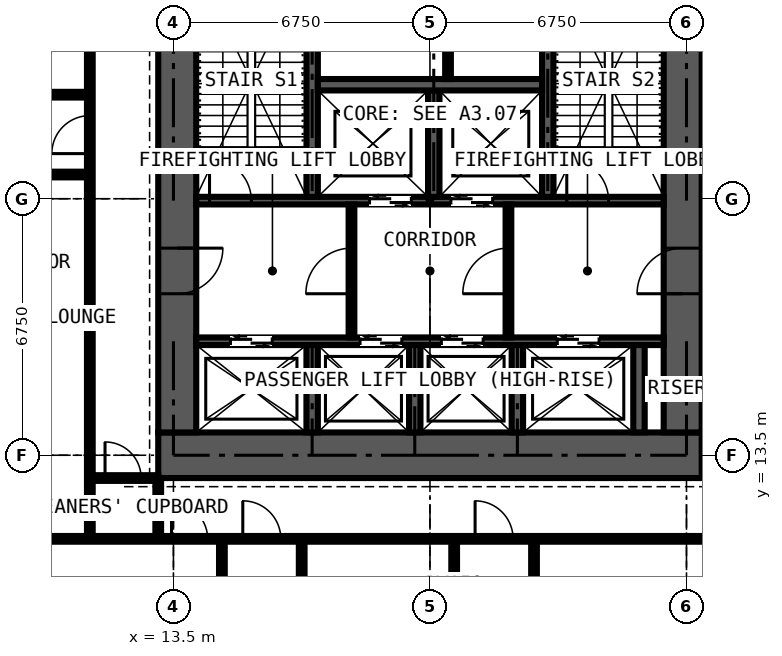
"""IFC4 building model, lengths in metres.
Left out: names, types, materials, properties, quantities, classifications, styles, units other than length and angle.
Written with IfcOpenShell. Run it as: python <this file> out.ifc"""

import sys

from ifc_helpers import new_model, si_unit, direction, frame, frame_2d, origin, place, context, subcontext, project, spatial, rectangle, extrude, element, fill, save


model = new_model("IFC4")
c1 = context("Model", 3, precision=1e-05, world=origin(), true_north=direction((0.0, 1.0)))
c2 = subcontext(c1, "Body", "Model", "MODEL_VIEW")
j1 = project(units=[si_unit("LENGTHUNIT", "METRE"), si_unit("PLANEANGLEUNIT", "RADIAN")], contexts=[c1])
p1 = place(None, origin())
s1 = spatial("IfcSite", under=j1, at=p1, CompositionType="ELEMENT")
p2 = place(p1, origin())
s2 = spatial("IfcBuilding", under=s1, at=p2, CompositionType="ELEMENT")
p3 = place(p2, frame((0.0, 0.0, 160.2)))
s3 = spatial("IfcBuildingStorey", under=s2, at=p3, CompositionType="ELEMENT", Elevation=160.2)
p4 = place(p3, frame((13.1, 13.5, 0.0), z_axis=(0.0, 0.0, 1.0), x_axis=(1.0, 0.0, 0.0)))
e1 = element("IfcWall", 1, at=p4, inside=s3, PredefinedType="SHEAR", context=c2, shape_type="SweptSolid", body=[
    extrude(rectangle(XDim=14.3, YDim=1.2, at=frame_2d((7.15, 0.0))), origin(), (0.0, 0.0, 1.0), 3.6),
])
p5 = place(p3, frame((26.9, 14.1, 0.0), z_axis=(0.0, 0.0, 1.0), x_axis=(0.0, 1.0, 0.0)))
e2 = element("IfcWall", 2, at=p5, inside=s3, PredefinedType="SHEAR", context=c2, shape_type="SweptSolid", body=[
    extrude(rectangle(XDim=12.3, YDim=1.0, at=frame_2d((6.15, 0.0))), origin(), (0.0, 0.0, 1.0), 3.6),
])
p6 = place(p5, frame((3.65, 0.0, 0.0)))
e3 = element("IfcOpeningElement", 3, at=p6, cuts=e2, PredefinedType="OPENING", context=c2, shape_type="SweptSolid", body=[
    extrude(rectangle(XDim=1.2, YDim=2.2, at=frame_2d((0.6, 1.1))), frame((0.0, 0.51, 0.0), z_axis=(0.0, -1.0, 0.0), x_axis=(1.0, 0.0, 0.0)), (0.0, 0.0, 1.0), 1.02),
])
p7 = place(p3, frame((13.6, 26.4, 0.0), z_axis=(0.0, 0.0, 1.0), x_axis=(0.0, -1.0, 0.0)))
e4 = element("IfcWall", 4, at=p7, inside=s3, PredefinedType="SHEAR", context=c2, shape_type="SweptSolid", body=[
    extrude(rectangle(XDim=12.3, YDim=1.0, at=frame_2d((6.15, 0.0))), origin(), (0.0, 0.0, 1.0), 3.6),
])
p8 = place(p7, frame((7.45, 0.0, 0.0)))
e5 = element("IfcOpeningElement", 5, at=p8, cuts=e4, PredefinedType="OPENING", context=c2, shape_type="SweptSolid", body=[
    extrude(rectangle(XDim=1.2, YDim=2.2, at=frame_2d((0.6, 1.1))), frame((0.0, 0.51, 0.0), z_axis=(0.0, -1.0, 0.0), x_axis=(1.0, 0.0, 0.0)), (0.0, 0.0, 1.0), 1.02),
])
p9 = place(p3, frame((14.1, 16.5, 0.0), z_axis=(0.0, 0.0, 1.0), x_axis=(1.0, 0.0, 0.0)))
e6 = element("IfcWall", 6, at=p9, inside=s3, PredefinedType="SHEAR", context=c2, shape_type="SweptSolid", body=[
    extrude(rectangle(XDim=12.3, YDim=0.2, at=frame_2d((6.15, 0.0))), origin(), (0.0, 0.0, 1.0), 3.6),
])
p10 = place(p9, frame((0.9, 0.0, 0.0)))
e7 = element("IfcOpeningElement", 7, at=p10, cuts=e6, PredefinedType="OPENING", context=c2, shape_type="SweptSolid", body=[
    extrude(rectangle(XDim=1.1, YDim=2.2, at=frame_2d((0.55, 1.1))), frame((0.0, 0.11, 0.0), z_axis=(0.0, -1.0, 0.0), x_axis=(1.0, 0.0, 0.0)), (0.0, 0.0, 1.0), 0.22),
])
p11 = place(p9, frame((4.31, 0.0, 0.0)))
e8 = element("IfcOpeningElement", 8, at=p11, cuts=e6, PredefinedType="OPENING", context=c2, shape_type="SweptSolid", body=[
    extrude(rectangle(XDim=1.1, YDim=2.2, at=frame_2d((0.55, 1.1))), frame((0.0, 0.11, 0.0), z_axis=(0.0, -1.0, 0.0), x_axis=(1.0, 0.0, 0.0)), (0.0, 0.0, 1.0), 0.22),
])
p12 = place(p9, frame((6.45, 0.0, 0.0)))
e9 = element("IfcOpeningElement", 9, at=p12, cuts=e6, PredefinedType="OPENING", context=c2, shape_type="SweptSolid", body=[
    extrude(rectangle(XDim=1.1, YDim=2.2, at=frame_2d((0.55, 1.1))), frame((0.0, 0.11, 0.0), z_axis=(0.0, -1.0, 0.0), x_axis=(1.0, 0.0, 0.0)), (0.0, 0.0, 1.0), 0.22),
])
p13 = place(p9, frame((9.5, 0.0, 0.0)))
e10 = element("IfcOpeningElement", 10, at=p13, cuts=e6, PredefinedType="OPENING", context=c2, shape_type="SweptSolid", body=[
    extrude(rectangle(XDim=1.1, YDim=2.2, at=frame_2d((0.55, 1.1))), frame((0.0, 0.11, 0.0), z_axis=(0.0, -1.0, 0.0), x_axis=(1.0, 0.0, 0.0)), (0.0, 0.0, 1.0), 0.22),
])
p14 = place(p3, frame((14.1, 20.2, 0.0), z_axis=(0.0, 0.0, 1.0), x_axis=(1.0, 0.0, 0.0)))
e11 = element("IfcWall", 11, at=p14, inside=s3, PredefinedType="SHEAR", context=c2, shape_type="SweptSolid", body=[
    extrude(rectangle(XDim=12.3, YDim=0.2, at=frame_2d((6.15, 0.0))), origin(), (0.0, 0.0, 1.0), 3.6),
])
p15 = place(p14, frame((4.56, 0.0, 0.0)))
e12 = element("IfcOpeningElement", 12, at=p15, cuts=e11, PredefinedType="OPENING", context=c2, shape_type="SweptSolid", body=[
    extrude(rectangle(XDim=1.1, YDim=2.2, at=frame_2d((0.55, 1.1))), frame((0.0, 0.11, 0.0), z_axis=(0.0, -1.0, 0.0), x_axis=(1.0, 0.0, 0.0)), (0.0, 0.0, 1.0), 0.22),
])
p16 = place(p14, frame((6.7, 0.0, 0.0)))
e13 = element("IfcOpeningElement", 13, at=p16, cuts=e11, PredefinedType="OPENING", context=c2, shape_type="SweptSolid", body=[
    extrude(rectangle(XDim=1.1, YDim=2.2, at=frame_2d((0.55, 1.1))), frame((0.0, 0.11, 0.0), z_axis=(0.0, -1.0, 0.0), x_axis=(1.0, 0.0, 0.0)), (0.0, 0.0, 1.0), 0.22),
])
p17 = place(p14, frame((0.35, 0.0, 0.0)))
e14 = element("IfcOpeningElement", 14, at=p17, cuts=e11, PredefinedType="OPENING", context=c2, shape_type="SweptSolid", body=[
    extrude(rectangle(XDim=1.1, YDim=2.2, at=frame_2d((0.55, 1.1))), frame((0.0, 0.11, 0.0), z_axis=(0.0, -1.0, 0.0), x_axis=(1.0, 0.0, 0.0)), (0.0, 0.0, 1.0), 0.22),
])
p18 = place(p14, frame((9.75, 0.0, 0.0)))
e15 = element("IfcOpeningElement", 15, at=p18, cuts=e11, PredefinedType="OPENING", context=c2, shape_type="SweptSolid", body=[
    extrude(rectangle(XDim=1.1, YDim=2.2, at=frame_2d((0.55, 1.1))), frame((0.0, 0.11, 0.0), z_axis=(0.0, -1.0, 0.0), x_axis=(1.0, 0.0, 0.0)), (0.0, 0.0, 1.0), 0.22),
])
for number, where, z_axis, x_axis in (
    (16, (17.15, 20.3, 0.0), (0.0, 0.0, 1.0), (0.0, 1.0, 0.0)),
    (17, (23.35, 20.3, 0.0), (0.0, 0.0, 1.0), (0.0, 1.0, 0.0)),
):
    element("IfcWall", number, at=place(p3, frame(where, z_axis=z_axis, x_axis=x_axis)), inside=s3, PredefinedType="SHEAR", context=c2, shape_type="SweptSolid", body=[
        extrude(rectangle(XDim=6.1, YDim=0.3, at=frame_2d((3.05, 0.0))), origin(), (0.0, 0.0, 1.0), 3.6),
    ])
p19 = place(p3, frame((20.35, 20.3, 0.0), z_axis=(0.0, 0.0, 1.0), x_axis=(0.0, 1.0, 0.0)))
e18 = element("IfcWall", 18, at=p19, inside=s3, PredefinedType="SHEAR", context=c2, shape_type="SweptSolid", body=[
    extrude(rectangle(XDim=2.8, YDim=0.3, at=frame_2d((1.4, 0.0))), origin(), (0.0, 0.0, 1.0), 3.6),
])
p20 = place(p3, frame((17.3, 23.25, 0.0), z_axis=(0.0, 0.0, 1.0), x_axis=(1.0, 0.0, 0.0)))
e19 = element("IfcWall", 19, at=p20, inside=s3, PredefinedType="SHEAR", context=c2, shape_type="SweptSolid", body=[
    extrude(rectangle(XDim=5.9, YDim=0.3, at=frame_2d((2.95, 0.0))), origin(), (0.0, 0.0, 1.0), 3.6),
])
for number, where, z_axis, x_axis in (
    (20, (17.15, 14.1, 0.0), (0.0, 0.0, 1.0), (0.0, 1.0, 0.0)),
    (21, (19.85, 14.1, 0.0), (0.0, 0.0, 1.0), (0.0, 1.0, 0.0)),
    (22, (22.55, 14.1, 0.0), (0.0, 0.0, 1.0), (0.0, 1.0, 0.0)),
    (23, (25.75, 14.1, 0.0), (0.0, 0.0, 1.0), (0.0, 1.0, 0.0)),
):
    element("IfcWall", number, at=place(p3, frame(where, z_axis=z_axis, x_axis=x_axis)), inside=s3, PredefinedType="SHEAR", context=c2, shape_type="SweptSolid", body=[
        extrude(rectangle(XDim=2.3, YDim=0.3, at=frame_2d((1.15, 0.0))), origin(), (0.0, 0.0, 1.0), 3.6),
    ])
p21 = place(p3, frame((18.185, 16.6, 0.0), z_axis=(0.0, 0.0, 1.0), x_axis=(0.0, 1.0, 0.0)))
e24 = element("IfcWall", 24, at=p21, inside=s3, PredefinedType="PARTITIONING", context=c2, shape_type="SweptSolid", body=[
    extrude(rectangle(XDim=3.5, YDim=0.15, at=frame_2d((1.75, 0.0))), origin(), (0.0, 0.0, 1.0), 3.375),
])
p22 = place(p21, frame((1.15, 0.0, 0.0)))
e25 = element("IfcOpeningElement", 25, at=p22, cuts=e24, PredefinedType="OPENING", context=c2, shape_type="SweptSolid", body=[
    extrude(rectangle(XDim=1.2, YDim=2.2, at=frame_2d((0.6, 1.1))), frame((0.0, 0.085, 0.0), z_axis=(0.0, -1.0, 0.0), x_axis=(1.0, 0.0, 0.0)), (0.0, 0.0, 1.0), 0.17),
])
p23 = place(p3, frame((22.315, 16.6, 0.0), z_axis=(0.0, 0.0, 1.0), x_axis=(0.0, 1.0, 0.0)))
e26 = element("IfcWall", 26, at=p23, inside=s3, PredefinedType="PARTITIONING", context=c2, shape_type="SweptSolid", body=[
    extrude(rectangle(XDim=3.5, YDim=0.15, at=frame_2d((1.75, 0.0))), origin(), (0.0, 0.0, 1.0), 3.375),
])
p24 = place(p23, frame((1.15, 0.0, 0.0)))
e27 = element("IfcOpeningElement", 27, at=p24, cuts=e26, PredefinedType="OPENING", context=c2, shape_type="SweptSolid", body=[
    extrude(rectangle(XDim=1.2, YDim=2.2, at=frame_2d((0.6, 1.1))), frame((0.0, 0.085, 0.0), z_axis=(0.0, -1.0, 0.0), x_axis=(1.0, 0.0, 0.0)), (0.0, 0.0, 1.0), 0.17),
])
p25 = place(p3, frame((20.725, 23.4, 0.0), z_axis=(0.0, 0.0, 1.0), x_axis=(0.0, 1.0, 0.0)))
e28 = element("IfcWall", 28, at=p25, inside=s3, PredefinedType="PARTITIONING", context=c2, shape_type="SweptSolid", body=[
    extrude(rectangle(XDim=3.0, YDim=0.15, at=frame_2d((1.5, 0.0))), origin(), (0.0, 0.0, 1.0), 3.375),
])
p26 = place(p3, frame((5.65, 20.887, 0.0), z_axis=(0.0, 0.0, 1.0), x_axis=(1.0, 0.0, 0.0)))
e29 = element("IfcWall", 29, at=p26, inside=s3, PredefinedType="PARTITIONING", context=c2, shape_type="SweptSolid", body=[
    extrude(rectangle(XDim=5.65, YDim=0.15, at=frame_2d((2.825, 0.0))), origin(), (0.0, 0.0, 1.0), 3.375),
])
p27 = place(p3, frame((5.65, 22.988, 0.0), z_axis=(0.0, 0.0, 1.0), x_axis=(1.0, 0.0, 0.0)))
e30 = element("IfcWall", 30, at=p27, inside=s3, PredefinedType="PARTITIONING", context=c2, shape_type="SweptSolid", body=[
    extrude(rectangle(XDim=5.65, YDim=0.15, at=frame_2d((2.825, 0.0))), origin(), (0.0, 0.0, 1.0), 3.375),
])
p28 = place(p27, frame((2.35, 0.0, 0.0)))
e31 = element("IfcOpeningElement", 31, at=p28, cuts=e30, PredefinedType="OPENING", context=c2, shape_type="SweptSolid", body=[
    extrude(rectangle(XDim=0.95, YDim=2.2, at=frame_2d((0.475, 1.1))), frame((0.0, 0.085, 0.0), z_axis=(0.0, -1.0, 0.0), x_axis=(1.0, 0.0, 0.0)), (0.0, 0.0, 1.0), 0.17),
])
p29 = place(p3, frame((10.125, 11.3, 0.0), z_axis=(0.0, 0.0, 1.0), x_axis=(1.0, 0.0, 0.0)))
e32 = element("IfcWall", 32, at=p29, inside=s3, PredefinedType="PARTITIONING", context=c2, shape_type="SweptSolid", body=[
    extrude(rectangle(XDim=20.25, YDim=0.15, at=frame_2d((10.125, 0.0))), origin(), (0.0, 0.0, 1.0), 3.375),
])
p30 = place(p29, frame((5.2, 0.0, 0.0)))
e33 = element("IfcOpeningElement", 33, at=p30, cuts=e32, PredefinedType="OPENING", context=c2, shape_type="SweptSolid", body=[
    extrude(rectangle(XDim=1.0, YDim=2.2, at=frame_2d((0.5, 1.1))), frame((0.0, 0.085, 0.0), z_axis=(0.0, -1.0, 0.0), x_axis=(1.0, 0.0, 0.0)), (0.0, 0.0, 1.0), 0.17),
])
p31 = place(p29, frame((11.312, 0.0, 0.0)))
e34 = element("IfcOpeningElement", 34, at=p31, cuts=e32, PredefinedType="OPENING", context=c2, shape_type="SweptSolid", body=[
    extrude(rectangle(XDim=1.0, YDim=2.2, at=frame_2d((0.5, 1.1))), frame((0.0, 0.085, 0.0), z_axis=(0.0, -1.0, 0.0), x_axis=(1.0, 0.0, 0.0)), (0.0, 0.0, 1.0), 0.17),
])
p32 = place(p29, frame((3.325, 0.0, 0.0)))
e35 = element("IfcOpeningElement", 35, at=p32, cuts=e32, PredefinedType="OPENING", context=c2, shape_type="SweptSolid", body=[
    extrude(rectangle(XDim=0.95, YDim=2.2, at=frame_2d((0.475, 1.1))), frame((0.0, 0.085, 0.0), z_axis=(0.0, -1.0, 0.0), x_axis=(1.0, 0.0, 0.0)), (0.0, 0.0, 1.0), 0.17),
])
p33 = place(p3, frame((11.3, 11.3, 0.0), z_axis=(0.0, 0.0, 1.0), x_axis=(0.0, 1.0, 0.0)))
e36 = element("IfcWall", 36, at=p33, inside=s3, PredefinedType="PARTITIONING", context=c2, shape_type="SweptSolid", body=[
    extrude(rectangle(XDim=19.3, YDim=0.15, at=frame_2d((9.65, 0.0))), origin(), (0.0, 0.0, 1.0), 3.375),
])
p34 = place(p33, frame((18.1, 0.0, 0.0)))
e37 = element("IfcOpeningElement", 37, at=p34, cuts=e36, PredefinedType="OPENING", context=c2, shape_type="SweptSolid", body=[
    extrude(rectangle(XDim=1.0, YDim=2.2, at=frame_2d((0.5, 1.1))), frame((0.0, 0.085, 0.0), z_axis=(0.0, -1.0, 0.0), x_axis=(1.0, 0.0, 0.0)), (0.0, 0.0, 1.0), 0.17),
])
p35 = place(p33, frame((10.137, 0.0, 0.0)))
e38 = element("IfcOpeningElement", 38, at=p35, cuts=e36, PredefinedType="OPENING", context=c2, shape_type="SweptSolid", body=[
    extrude(rectangle(XDim=1.0, YDim=2.2, at=frame_2d((0.5, 1.1))), frame((0.0, 0.085, 0.0), z_axis=(0.0, -1.0, 0.0), x_axis=(1.0, 0.0, 0.0)), (0.0, 0.0, 1.0), 0.17),
])
p36 = place(p3, frame((11.3, 12.9, 0.0), z_axis=(0.0, 0.0, 1.0), x_axis=(1.0, 0.0, 0.0)))
e39 = element("IfcWall", 39, at=p36, inside=s3, PredefinedType="PARTITIONING", context=c2, shape_type="SweptSolid", body=[
    extrude(rectangle(XDim=1.8, YDim=0.15, at=frame_2d((0.9, 0.0))), origin(), (0.0, 0.0, 1.0), 2.806),
])
p37 = place(p36, frame((0.4, 0.0, 0.0)))
e40 = element("IfcOpeningElement", 40, at=p37, cuts=e39, PredefinedType="OPENING", context=c2, shape_type="SweptSolid", body=[
    extrude(rectangle(XDim=0.95, YDim=2.2, at=frame_2d((0.475, 1.1))), frame((0.0, 0.085, 0.0), z_axis=(0.0, -1.0, 0.0), x_axis=(1.0, 0.0, 0.0)), (0.0, 0.0, 1.0), 0.17),
])
p38 = place(p3, frame((13.1, 11.3, 0.0), z_axis=(0.0, 0.0, 1.0), x_axis=(0.0, 1.0, 0.0)))
e41 = element("IfcWall", 41, at=p38, inside=s3, PredefinedType="PARTITIONING", context=c2, shape_type="SweptSolid", body=[
    extrude(rectangle(XDim=1.6, YDim=0.15, at=frame_2d((0.8, 0.0))), origin(), (0.0, 0.0, 1.0), 3.375),
])
p39 = place(p3, frame((14.775, 5.65, 0.0), z_axis=(0.0, 0.0, 1.0), x_axis=(0.0, 1.0, 0.0)))
e42 = element("IfcWall", 42, at=p39, inside=s3, PredefinedType="PARTITIONING", context=c2, shape_type="SweptSolid", body=[
    extrude(rectangle(XDim=5.65, YDim=0.15, at=frame_2d((2.825, 0.0))), origin(), (0.0, 0.0, 1.0), 3.375),
])
p40 = place(p3, frame((16.875, -0.734, 0.0), z_axis=(0.0, 0.0, 1.0), x_axis=(0.0, 1.0, 0.0)))
e43 = element("IfcWall", 43, at=p40, inside=s3, PredefinedType="PARTITIONING", context=c2, shape_type="SweptSolid", body=[
    extrude(rectangle(XDim=12.034, YDim=0.15, at=frame_2d((6.017, 0.0))), origin(), (0.0, 0.0, 1.0), 3.375),
])
p41 = place(p3, frame((20.887, 5.65, 0.0), z_axis=(0.0, 0.0, 1.0), x_axis=(0.0, 1.0, 0.0)))
e44 = element("IfcWall", 44, at=p41, inside=s3, PredefinedType="PARTITIONING", context=c2, shape_type="SweptSolid", body=[
    extrude(rectangle(XDim=5.65, YDim=0.15, at=frame_2d((2.825, 0.0))), origin(), (0.0, 0.0, 1.0), 3.375),
])
p42 = place(p41, frame((2.35, 0.0, 0.0)))
e45 = element("IfcOpeningElement", 45, at=p42, cuts=e44, PredefinedType="OPENING", context=c2, shape_type="SweptSolid", body=[
    extrude(rectangle(XDim=0.95, YDim=2.2, at=frame_2d((0.475, 1.1))), frame((0.0, 0.085, 0.0), z_axis=(0.0, -1.0, 0.0), x_axis=(1.0, 0.0, 0.0)), (0.0, 0.0, 1.0), 0.17),
])
p43 = place(p3, frame((22.988, 5.65, 0.0), z_axis=(0.0, 0.0, 1.0), x_axis=(0.0, 1.0, 0.0)))
e46 = element("IfcWall", 46, at=p43, inside=s3, PredefinedType="PARTITIONING", context=c2, shape_type="SweptSolid", body=[
    extrude(rectangle(XDim=5.65, YDim=0.15, at=frame_2d((2.825, 0.0))), origin(), (0.0, 0.0, 1.0), 3.375),
])
p44 = place(p10, origin())
e47 = element("IfcDoor", 47, at=p44, inside=s3, OperationType="DOUBLE_DOOR_SLIDING", PredefinedType="DOOR", context=c2, shape_type="SweptSolid", body=[
    extrude(rectangle(XDim=1.1, YDim=2.2, at=frame_2d((0.55, 1.1))), frame((0.0, 0.025, 0.0), z_axis=(0.0, -1.0, 0.0), x_axis=(1.0, 0.0, 0.0)), (0.0, 0.0, 1.0), 0.05),
])
fill(e7, e47)
p45 = place(p11, origin())
e48 = element("IfcDoor", 48, at=p45, inside=s3, OperationType="DOUBLE_DOOR_SLIDING", PredefinedType="DOOR", context=c2, shape_type="SweptSolid", body=[
    extrude(rectangle(XDim=1.1, YDim=2.2, at=frame_2d((0.55, 1.1))), frame((0.0, 0.025, 0.0), z_axis=(0.0, -1.0, 0.0), x_axis=(1.0, 0.0, 0.0)), (0.0, 0.0, 1.0), 0.05),
])
fill(e8, e48)
p46 = place(p12, origin())
e49 = element("IfcDoor", 49, at=p46, inside=s3, OperationType="DOUBLE_DOOR_SLIDING", PredefinedType="DOOR", context=c2, shape_type="SweptSolid", body=[
    extrude(rectangle(XDim=1.1, YDim=2.2, at=frame_2d((0.55, 1.1))), frame((0.0, 0.025, 0.0), z_axis=(0.0, -1.0, 0.0), x_axis=(1.0, 0.0, 0.0)), (0.0, 0.0, 1.0), 0.05),
])
fill(e9, e49)
p47 = place(p13, origin())
e50 = element("IfcDoor", 50, at=p47, inside=s3, OperationType="DOUBLE_DOOR_SLIDING", PredefinedType="DOOR", context=c2, shape_type="SweptSolid", body=[
    extrude(rectangle(XDim=1.1, YDim=2.2, at=frame_2d((0.55, 1.1))), frame((0.0, 0.025, 0.0), z_axis=(0.0, -1.0, 0.0), x_axis=(1.0, 0.0, 0.0)), (0.0, 0.0, 1.0), 0.05),
])
fill(e10, e50)
p48 = place(p15, origin())
e51 = element("IfcDoor", 51, at=p48, inside=s3, OperationType="DOUBLE_DOOR_SLIDING", PredefinedType="DOOR", context=c2, shape_type="SweptSolid", body=[
    extrude(rectangle(XDim=1.1, YDim=2.2, at=frame_2d((0.55, 1.1))), frame((0.0, 0.025, 0.0), z_axis=(0.0, -1.0, 0.0), x_axis=(1.0, 0.0, 0.0)), (0.0, 0.0, 1.0), 0.05),
])
fill(e12, e51)
p49 = place(p16, origin())
e52 = element("IfcDoor", 52, at=p49, inside=s3, OperationType="DOUBLE_DOOR_SLIDING", PredefinedType="DOOR", context=c2, shape_type="SweptSolid", body=[
    extrude(rectangle(XDim=1.1, YDim=2.2, at=frame_2d((0.55, 1.1))), frame((0.0, 0.025, 0.0), z_axis=(0.0, -1.0, 0.0), x_axis=(1.0, 0.0, 0.0)), (0.0, 0.0, 1.0), 0.05),
])
fill(e13, e52)
p50 = place(p8, origin())
e53 = element("IfcDoor", 53, at=p50, inside=s3, OperationType="DOUBLE_DOOR_SINGLE_SWING", PredefinedType="DOOR", context=c2, shape_type="SweptSolid", body=[
    extrude(rectangle(XDim=1.2, YDim=2.2, at=frame_2d((0.6, 1.1))), frame((0.0, 0.025, 0.0), z_axis=(0.0, -1.0, 0.0), x_axis=(1.0, 0.0, 0.0)), (0.0, 0.0, 1.0), 0.05),
])
fill(e5, e53)
p51 = place(p6, origin())
e54 = element("IfcDoor", 54, at=p51, inside=s3, OperationType="DOUBLE_DOOR_SINGLE_SWING", PredefinedType="DOOR", context=c2, shape_type="SweptSolid", body=[
    extrude(rectangle(XDim=1.2, YDim=2.2, at=frame_2d((0.6, 1.1))), frame((0.0, 0.025, 0.0), z_axis=(0.0, -1.0, 0.0), x_axis=(1.0, 0.0, 0.0)), (0.0, 0.0, 1.0), 0.05),
])
fill(e3, e54)
p52 = place(p22, origin())
e55 = element("IfcDoor", 55, at=p52, inside=s3, OperationType="DOUBLE_DOOR_SINGLE_SWING", PredefinedType="DOOR", context=c2, shape_type="SweptSolid", body=[
    extrude(rectangle(XDim=1.2, YDim=2.2, at=frame_2d((0.6, 1.1))), frame((0.0, 0.025, 0.0), z_axis=(0.0, -1.0, 0.0), x_axis=(1.0, 0.0, 0.0)), (0.0, 0.0, 1.0), 0.05),
])
fill(e25, e55)
p53 = place(p24, origin())
e56 = element("IfcDoor", 56, at=p53, inside=s3, OperationType="DOUBLE_DOOR_SINGLE_SWING", PredefinedType="DOOR", context=c2, shape_type="SweptSolid", body=[
    extrude(rectangle(XDim=1.2, YDim=2.2, at=frame_2d((0.6, 1.1))), frame((0.0, 0.025, 0.0), z_axis=(0.0, -1.0, 0.0), x_axis=(1.0, 0.0, 0.0)), (0.0, 0.0, 1.0), 0.05),
])
fill(e27, e56)
p54 = place(p17, origin())
e57 = element("IfcDoor", 57, at=p54, inside=s3, OperationType="SINGLE_SWING_LEFT", PredefinedType="DOOR", context=c2, shape_type="SweptSolid", body=[
    extrude(rectangle(XDim=1.1, YDim=2.2, at=frame_2d((0.55, 1.1))), frame((0.0, 0.025, 0.0), z_axis=(0.0, -1.0, 0.0), x_axis=(1.0, 0.0, 0.0)), (0.0, 0.0, 1.0), 0.05),
])
fill(e14, e57)
p55 = place(p18, origin())
e58 = element("IfcDoor", 58, at=p55, inside=s3, OperationType="SINGLE_SWING_LEFT", PredefinedType="DOOR", context=c2, shape_type="SweptSolid", body=[
    extrude(rectangle(XDim=1.1, YDim=2.2, at=frame_2d((0.55, 1.1))), frame((0.0, 0.025, 0.0), z_axis=(0.0, -1.0, 0.0), x_axis=(1.0, 0.0, 0.0)), (0.0, 0.0, 1.0), 0.05),
])
fill(e15, e58)
p56 = place(p37, origin())
e59 = element("IfcDoor", 59, at=p56, inside=s3, OperationType="SINGLE_SWING_LEFT", PredefinedType="DOOR", context=c2, shape_type="SweptSolid", body=[
    extrude(rectangle(XDim=0.95, YDim=2.2, at=frame_2d((0.475, 1.1))), frame((0.0, 0.025, 0.0), z_axis=(0.0, -1.0, 0.0), x_axis=(1.0, 0.0, 0.0)), (0.0, 0.0, 1.0), 0.05),
])
fill(e40, e59)
p57 = place(p30, origin())
e60 = element("IfcDoor", 60, at=p57, inside=s3, OperationType="SINGLE_SWING_LEFT", PredefinedType="DOOR", context=c2, shape_type="SweptSolid", body=[
    extrude(rectangle(XDim=1.0, YDim=2.2, at=frame_2d((0.5, 1.1))), frame((0.0, 0.025, 0.0), z_axis=(0.0, -1.0, 0.0), x_axis=(1.0, 0.0, 0.0)), (0.0, 0.0, 1.0), 0.05),
])
fill(e33, e60)
p58 = place(p31, origin())
e61 = element("IfcDoor", 61, at=p58, inside=s3, OperationType="SINGLE_SWING_LEFT", PredefinedType="DOOR", context=c2, shape_type="SweptSolid", body=[
    extrude(rectangle(XDim=1.0, YDim=2.2, at=frame_2d((0.5, 1.1))), frame((0.0, 0.025, 0.0), z_axis=(0.0, -1.0, 0.0), x_axis=(1.0, 0.0, 0.0)), (0.0, 0.0, 1.0), 0.05),
])
fill(e34, e61)
p59 = place(p32, origin())
e62 = element("IfcDoor", 62, at=p59, inside=s3, OperationType="SINGLE_SWING_LEFT", PredefinedType="DOOR", context=c2, shape_type="SweptSolid", body=[
    extrude(rectangle(XDim=0.95, YDim=2.2, at=frame_2d((0.475, 1.1))), frame((0.0, 0.025, 0.0), z_axis=(0.0, -1.0, 0.0), x_axis=(1.0, 0.0, 0.0)), (0.0, 0.0, 1.0), 0.05),
])
fill(e35, e62)
p60 = place(p35, origin())
e63 = element("IfcDoor", 63, at=p60, inside=s3, OperationType="SINGLE_SWING_LEFT", PredefinedType="DOOR", context=c2, shape_type="SweptSolid", body=[
    extrude(rectangle(XDim=1.0, YDim=2.2, at=frame_2d((0.5, 1.1))), frame((0.0, 0.025, 0.0), z_axis=(0.0, -1.0, 0.0), x_axis=(1.0, 0.0, 0.0)), (0.0, 0.0, 1.0), 0.05),
])
fill(e38, e63)
save(model, sys.argv[1])
